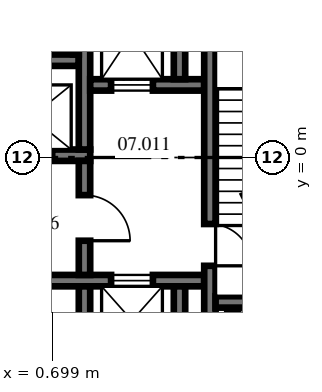
"""IFC4 building model, lengths in metres.
Left out: names, types, materials, properties, quantities, classifications, styles, units other than length and angle.
Written with IfcOpenShell. Run it as: python <this file> out.ifc"""

import sys

from ifc_helpers import new_model, si_unit, direction, frame, frame_2d, origin, place, context, subcontext, project, spatial, polyline, rectangle, outline, extrude, source, transform, mapped, element, fill, save


model = new_model("IFC4")
c1 = context("Model", 3, precision=1e-05, world=origin(), true_north=direction((0.0, 1.0)))
c2 = subcontext(c1, "Body", "Model", "MODEL_VIEW")
j1 = project(units=[si_unit("LENGTHUNIT", "METRE"), si_unit("PLANEANGLEUNIT", "RADIAN")], contexts=[c1])
p1 = place(None, origin())
s1 = spatial("IfcSite", under=j1, at=p1, CompositionType="ELEMENT")
p2 = place(p1, origin())
s2 = spatial("IfcBuilding", under=s1, at=p2, CompositionType="ELEMENT")
p3 = place(p2, frame((0.0, 0.0, 33.2)))
s3 = spatial("IfcBuildingStorey", under=s2, at=p3, CompositionType="ELEMENT", Elevation=33.2)
m1 = source(origin(), c2, "Body", "SweptSolid", [
    extrude(rectangle(XDim=11.5, YDim=0.3, at=frame_2d((5.75, 0.0))), origin(), (0.0, 0.0, 1.0), 4.1),
])
p4 = place(p3, frame((-9.8, 0.06, 0.0), z_axis=(0.0, 0.0, 1.0), x_axis=(1.0, 0.0, 0.0)))
e1 = element("IfcWall", 1, at=p4, inside=s3, PredefinedType="SHEAR", context=c2, shape_type="MappedRepresentation", body=[
    mapped(m1, transform((0.0, 0.0, 0.0), scale=1.0)),
])
p5 = place(p4, frame((1.0, 0.0, 0.0)))
e2 = element("IfcOpeningElement", 2, at=p5, cuts=e1, PredefinedType="OPENING", context=c2, shape_type="SweptSolid", body=[
    extrude(rectangle(XDim=1.1, YDim=2.1, at=frame_2d((0.55, 1.05))), frame((0.0, 0.16, 0.0), z_axis=(0.0, -1.0, 0.0), x_axis=(1.0, 0.0, 0.0)), (0.0, 0.0, 1.0), 0.32),
])
p6 = place(p4, frame((3.8, 0.0, 0.0)))
e3 = element("IfcOpeningElement", 3, at=p6, cuts=e1, PredefinedType="OPENING", context=c2, shape_type="SweptSolid", body=[
    extrude(rectangle(XDim=1.1, YDim=2.1, at=frame_2d((0.55, 1.05))), frame((0.0, 0.16, 0.0), z_axis=(0.0, -1.0, 0.0), x_axis=(1.0, 0.0, 0.0)), (0.0, 0.0, 1.0), 0.32),
])
p7 = place(p4, frame((6.6, 0.0, 0.0)))
e4 = element("IfcOpeningElement", 4, at=p7, cuts=e1, PredefinedType="OPENING", context=c2, shape_type="SweptSolid", body=[
    extrude(rectangle(XDim=1.1, YDim=2.1, at=frame_2d((0.55, 1.05))), frame((0.0, 0.16, 0.0), z_axis=(0.0, -1.0, 0.0), x_axis=(1.0, 0.0, 0.0)), (0.0, 0.0, 1.0), 0.32),
])
p8 = place(p4, frame((9.4, 0.0, 0.0)))
e5 = element("IfcOpeningElement", 5, at=p8, cuts=e1, PredefinedType="OPENING", context=c2, shape_type="SweptSolid", body=[
    extrude(rectangle(XDim=1.1, YDim=2.1, at=frame_2d((0.55, 1.05))), frame((0.0, 0.16, 0.0), z_axis=(0.0, -1.0, 0.0), x_axis=(1.0, 0.0, 0.0)), (0.0, 0.0, 1.0), 0.32),
])
m2 = source(origin(), c2, "Body", "SweptSolid", [
    extrude(outline(polyline([(11.2, -0.15), (-0.349, -0.15), (-0.176, 0.15), (11.2, 0.15), (11.2, -0.15)])), origin(), (0.0, 0.0, 1.0), 4.1),
])
p9 = place(p3, frame((-9.8, 2.56, 0.0), z_axis=(0.0, 0.0, 1.0), x_axis=(1.0, 0.0, 0.0)))
e6 = element("IfcWall", 6, at=p9, inside=s3, PredefinedType="SHEAR", context=c2, shape_type="MappedRepresentation", body=[
    mapped(m2, transform((0.0, 0.0, 0.0), scale=1.0)),
])
m3 = source(origin(), c2, "Body", "SweptSolid", [
    extrude(rectangle(XDim=4.45, YDim=0.3, at=frame_2d((2.225, 0.0))), origin(), (0.0, 0.0, 1.0), 4.1),
])
p10 = place(p3, frame((1.55, 0.21, 0.0), z_axis=(0.0, 0.0, 1.0), x_axis=(0.0, 1.0, 0.0)))
e7 = element("IfcWall", 7, at=p10, inside=s3, PredefinedType="SHEAR", context=c2, shape_type="MappedRepresentation", body=[
    mapped(m3, transform((0.0, 0.0, 0.0), scale=1.0)),
])
m4 = source(origin(), c2, "Body", "SweptSolid", [
    extrude(rectangle(XDim=3.0, YDim=0.3, at=frame_2d((1.5, 0.0))), origin(), (0.0, 0.0, 1.0), 4.1),
])
p11 = place(p3, frame((1.7, 1.91, 0.0), z_axis=(0.0, 0.0, 1.0), x_axis=(1.0, 0.0, 0.0)))
e8 = element("IfcWall", 8, at=p11, inside=s3, PredefinedType="SHEAR", context=c2, shape_type="MappedRepresentation", body=[
    mapped(m4, transform((0.0, 0.0, 0.0), scale=1.0)),
])
p12 = place(p11, frame((0.55, 0.0, 0.0)))
e9 = element("IfcOpeningElement", 9, at=p12, cuts=e8, PredefinedType="OPENING", context=c2, shape_type="SweptSolid", body=[
    extrude(rectangle(XDim=1.1, YDim=2.1, at=frame_2d((0.55, 1.05))), frame((0.0, 0.16, 0.0), z_axis=(0.0, -1.0, 0.0), x_axis=(1.0, 0.0, 0.0)), (0.0, 0.0, 1.0), 0.32),
])
m5 = source(origin(), c2, "Body", "SweptSolid", [
    extrude(rectangle(XDim=2.9, YDim=0.3, at=frame_2d((1.45, 0.0))), origin(), (0.0, 0.0, 1.0), 4.1),
])
p13 = place(p3, frame((4.05, 2.06, 0.0), z_axis=(0.0, 0.0, 1.0), x_axis=(0.0, 1.0, 0.0)))
e10 = element("IfcWall", 10, at=p13, inside=s3, PredefinedType="SHEAR", context=c2, shape_type="MappedRepresentation", body=[
    mapped(m5, transform((0.0, 0.0, 0.0), scale=1.0)),
])
m6 = source(origin(), c2, "Body", "SweptSolid", [
    extrude(rectangle(XDim=12.8, YDim=0.3, at=frame_2d((6.4, 0.0))), origin(), (0.0, 0.0, 1.0), 4.1),
])
p14 = place(p3, frame((-8.1, -3.24, 0.0), z_axis=(0.0, 0.0, 1.0), x_axis=(1.0, 0.0, 0.0)))
e11 = element("IfcWall", 11, at=p14, inside=s3, PredefinedType="SHEAR", context=c2, shape_type="MappedRepresentation", body=[
    mapped(m6, transform((0.0, 0.0, 0.0), scale=1.0)),
])
p15 = place(p14, frame((0.913, 0.0, 0.0)))
e12 = element("IfcOpeningElement", 12, at=p15, cuts=e11, PredefinedType="OPENING", context=c2, shape_type="SweptSolid", body=[
    extrude(rectangle(XDim=0.9, YDim=2.1, at=frame_2d((0.45, 1.05))), frame((0.0, 0.16, 0.0), z_axis=(0.0, -1.0, 0.0), x_axis=(1.0, 0.0, 0.0)), (0.0, 0.0, 1.0), 0.32),
])
p16 = place(p14, frame((3.05, 0.0, 0.0)))
e13 = element("IfcOpeningElement", 13, at=p16, cuts=e11, PredefinedType="OPENING", context=c2, shape_type="SweptSolid", body=[
    extrude(rectangle(XDim=0.9, YDim=2.1, at=frame_2d((0.45, 1.05))), frame((0.0, 0.16, 0.0), z_axis=(0.0, -1.0, 0.0), x_axis=(1.0, 0.0, 0.0)), (0.0, 0.0, 1.0), 0.32),
])
p17 = place(p14, frame((6.587, 0.0, 0.0)))
e14 = element("IfcOpeningElement", 14, at=p17, cuts=e11, PredefinedType="OPENING", context=c2, shape_type="SweptSolid", body=[
    extrude(rectangle(XDim=0.9, YDim=2.1, at=frame_2d((0.45, 1.05))), frame((0.0, 0.16, 0.0), z_axis=(0.0, -1.0, 0.0), x_axis=(1.0, 0.0, 0.0)), (0.0, 0.0, 1.0), 0.32),
])
p18 = place(p14, frame((10.35, 0.0, 0.0)))
e15 = element("IfcOpeningElement", 15, at=p18, cuts=e11, PredefinedType="OPENING", context=c2, shape_type="SweptSolid", body=[
    extrude(rectangle(XDim=1.1, YDim=2.1, at=frame_2d((0.55, 1.05))), frame((0.0, 0.16, 0.0), z_axis=(0.0, -1.0, 0.0), x_axis=(1.0, 0.0, 0.0)), (0.0, 0.0, 1.0), 0.32),
])
m7 = source(origin(), c2, "Body", "SweptSolid", [
    extrude(rectangle(XDim=2.2, YDim=0.3, at=frame_2d((1.1, 0.0))), origin(), (0.0, 0.0, 1.0), 4.1),
])
p19 = place(p3, frame((1.55, -5.59, 0.0), z_axis=(0.0, 0.0, 1.0), x_axis=(0.0, 1.0, 0.0)))
e16 = element("IfcWall", 16, at=p19, inside=s3, PredefinedType="SHEAR", context=c2, shape_type="MappedRepresentation", body=[
    mapped(m7, transform((0.0, 0.0, 0.0), scale=1.0)),
])
m8 = source(origin(), c2, "Body", "SweptSolid", [
    extrude(rectangle(XDim=2.5, YDim=0.3, at=frame_2d((1.25, 0.0))), origin(), (0.0, 0.0, 1.0), 4.1),
])
p20 = place(p3, frame((4.05, -5.89, 0.0), z_axis=(0.0, 0.0, 1.0), x_axis=(0.0, 1.0, 0.0)))
e17 = element("IfcWall", 17, at=p20, inside=s3, PredefinedType="SHEAR", context=c2, shape_type="MappedRepresentation", body=[
    mapped(m8, transform((0.0, 0.0, 0.0), scale=1.0)),
])
p21 = place(p3, frame((1.55, -3.09, 0.0), z_axis=(0.0, 0.0, 1.0), x_axis=(0.0, 1.0, 0.0)))
e18 = element("IfcWall", 18, at=p21, inside=s3, PredefinedType="SHEAR", context=c2, shape_type="MappedRepresentation", body=[
    mapped(m4, transform((0.0, 0.0, 0.0), scale=1.0)),
])
p22 = place(p21, frame((0.9, 0.0, 0.0)))
e19 = element("IfcOpeningElement", 19, at=p22, cuts=e18, PredefinedType="OPENING", context=c2, shape_type="SweptSolid", body=[
    extrude(rectangle(XDim=1.2, YDim=2.1, at=frame_2d((0.6, 1.05))), frame((0.0, 0.16, 0.0), z_axis=(0.0, -1.0, 0.0), x_axis=(1.0, 0.0, 0.0)), (0.0, 0.0, 1.0), 0.32),
])
m9 = source(origin(), c2, "Body", "SweptSolid", [
    extrude(outline(polyline([(-0.15, -0.15), (9.99, -0.15), (9.99, 0.15), (0.15, 0.15), (-0.15, -0.15)])), origin(), (0.0, 0.0, 1.0), 4.1),
])
p23 = place(p3, frame((4.85, -6.04, 0.0), z_axis=(0.0, 0.0, 1.0), x_axis=(0.0, 1.0, 0.0)))
e20 = element("IfcWall", 20, at=p23, inside=s3, PredefinedType="SHEAR", context=c2, shape_type="MappedRepresentation", body=[
    mapped(m9, transform((0.0, 0.0, 0.0), scale=1.0)),
])
p24 = place(p23, frame((3.19, 0.0, 0.0)))
e21 = element("IfcOpeningElement", 21, at=p24, cuts=e20, PredefinedType="OPENING", context=c2, shape_type="SweptSolid", body=[
    extrude(rectangle(XDim=1.1, YDim=2.1, at=frame_2d((0.55, 1.05))), frame((0.0, 0.16, 0.0), z_axis=(0.0, -1.0, 0.0), x_axis=(1.0, 0.0, 0.0)), (0.0, 0.0, 1.0), 0.32),
])
m10 = source(origin(), c2, "Body", "SweptSolid", [
    extrude(outline(polyline([(0.0, -0.15), (0.0, 0.15), (4.433, 0.15), (4.26, -0.15), (0.0, -0.15)])), origin(), (0.0, 0.0, 1.0), 4.1),
])
p25 = place(p3, frame((5.0, -3.8, 0.0), z_axis=(0.0, 0.0, 1.0), x_axis=(1.0, 0.0, 0.0)))
e22 = element("IfcWall", 22, at=p25, inside=s3, PredefinedType="SHEAR", context=c2, shape_type="MappedRepresentation", body=[
    mapped(m10, transform((0.0, 0.0, 0.0), scale=1.0)),
])
p26 = place(p25, frame((2.45, 0.0, 0.0)))
e23 = element("IfcOpeningElement", 23, at=p26, cuts=e22, PredefinedType="OPENING", context=c2, shape_type="SweptSolid", body=[
    extrude(rectangle(XDim=1.1, YDim=2.1, at=frame_2d((0.55, 1.05))), frame((0.0, 0.16, 0.0), z_axis=(0.0, -1.0, 0.0), x_axis=(1.0, 0.0, 0.0)), (0.0, 0.0, 1.0), 0.32),
])
m11 = source(origin(), c2, "Body", "SweptSolid", [
    extrude(rectangle(XDim=3.18, YDim=0.15, at=frame_2d((1.59, 0.0))), origin(), (0.0, 0.0, 1.0), 4.1),
])
p27 = place(p3, frame((1.325, 2.71, 0.0), z_axis=(0.0, 0.0, 1.0), x_axis=(0.0, 1.0, 0.0)))
e24 = element("IfcWall", 24, at=p27, inside=s3, PredefinedType="PARTITIONING", context=c2, shape_type="MappedRepresentation", body=[
    mapped(m11, transform((0.0, 0.0, 0.0), scale=1.0)),
])
p28 = place(p27, frame((2.265, 0.0, 0.0)))
e25 = element("IfcOpeningElement", 25, at=p28, cuts=e24, PredefinedType="OPENING", context=c2, shape_type="SweptSolid", body=[
    extrude(rectangle(XDim=0.9, YDim=2.1, at=frame_2d((0.45, 1.05))), frame((0.0, 0.085, 0.0), z_axis=(0.0, -1.0, 0.0), x_axis=(1.0, 0.0, 0.0)), (0.0, 0.0, 1.0), 0.17),
])
p29 = place(p24, frame((1.1, 0.0, 0.0), z_axis=(0.0, 0.0, 1.0), x_axis=(-1.0, 0.0, 0.0)))
e26 = element("IfcDoor", 26, at=p29, inside=s3, OperationType="SINGLE_SWING_RIGHT", PredefinedType="DOOR", context=c2, shape_type="SweptSolid", body=[
    extrude(rectangle(XDim=1.1, YDim=2.1, at=frame_2d((0.55, 1.05))), frame((0.0, 0.025, 0.0), z_axis=(0.0, -1.0, 0.0), x_axis=(1.0, 0.0, 0.0)), (0.0, 0.0, 1.0), 0.05),
])
fill(e21, e26)
p30 = place(p22, frame((1.2, 0.0, 0.0), z_axis=(0.0, 0.0, 1.0), x_axis=(-1.0, 0.0, 0.0)))
e27 = element("IfcDoor", 27, at=p30, inside=s3, OperationType="SINGLE_SWING_RIGHT", PredefinedType="DOOR", context=c2, shape_type="SweptSolid", body=[
    extrude(rectangle(XDim=1.2, YDim=2.1, at=frame_2d((0.6, 1.05))), frame((0.0, 0.025, 0.0), z_axis=(0.0, -1.0, 0.0), x_axis=(1.0, 0.0, 0.0)), (0.0, 0.0, 1.0), 0.05),
])
fill(e19, e27)
p31 = place(p12, origin())
e28 = element("IfcDoor", 28, at=p31, inside=s3, OperationType="DOUBLE_DOOR_SLIDING", PredefinedType="DOOR", context=c2, shape_type="SweptSolid", body=[
    extrude(rectangle(XDim=1.1, YDim=2.1, at=frame_2d((0.55, 1.05))), frame((0.0, 0.025, 0.0), z_axis=(0.0, -1.0, 0.0), x_axis=(1.0, 0.0, 0.0)), (0.0, 0.0, 1.0), 0.05),
])
fill(e9, e28)
p32 = place(p18, origin())
e29 = element("IfcDoor", 29, at=p32, inside=s3, OperationType="DOUBLE_DOOR_SLIDING", PredefinedType="DOOR", context=c2, shape_type="SweptSolid", body=[
    extrude(rectangle(XDim=1.1, YDim=2.1, at=frame_2d((0.55, 1.05))), frame((0.0, 0.025, 0.0), z_axis=(0.0, -1.0, 0.0), x_axis=(1.0, 0.0, 0.0)), (0.0, 0.0, 1.0), 0.05),
])
fill(e15, e29)
save(model, sys.argv[1])
